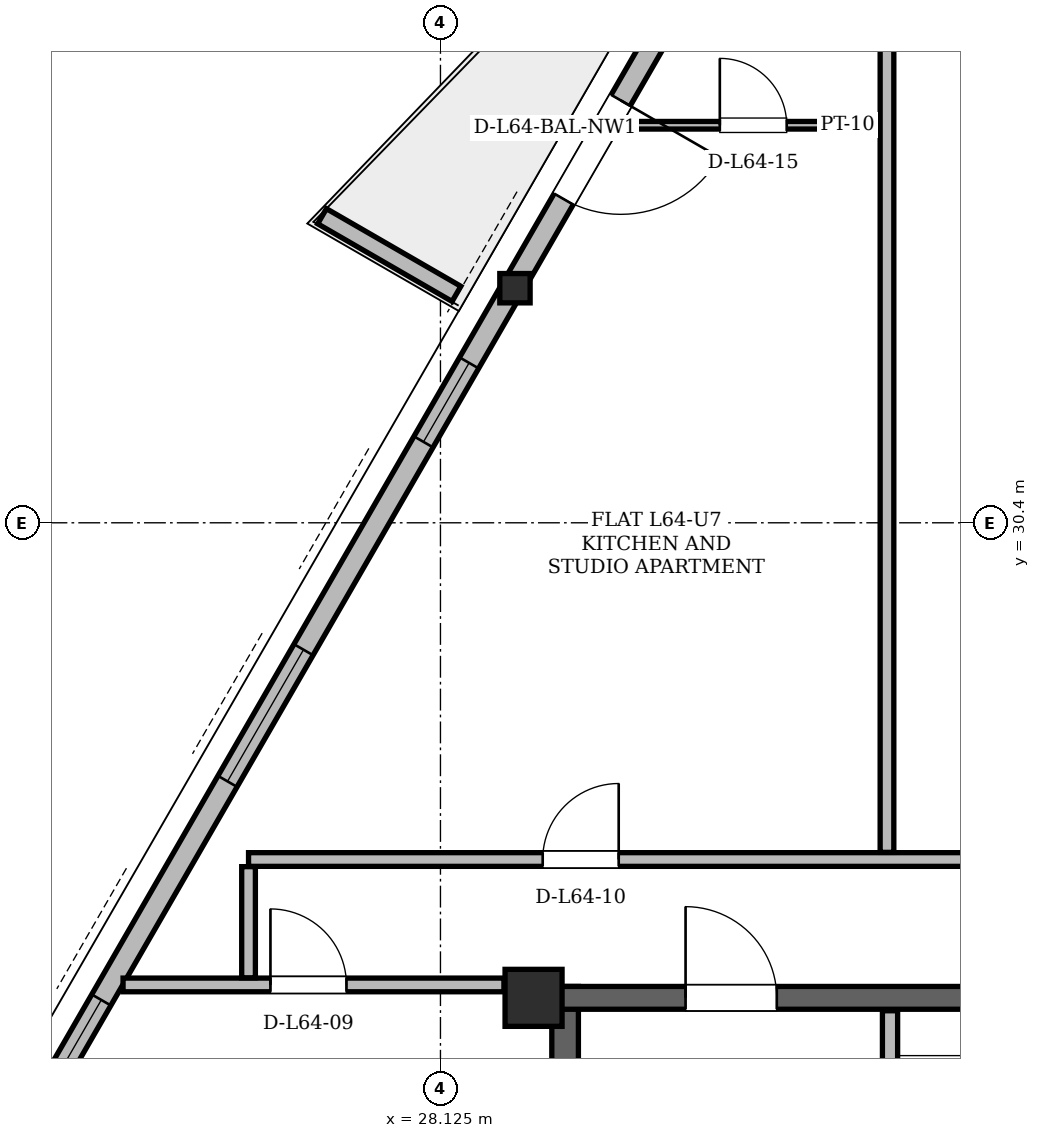
"""IFC4 building model, lengths in metres.
Left out: names, types, materials, properties, quantities, classifications, styles, units other than length and angle.
Written with IfcOpenShell. Run it as: python <this file> out.ifc"""

import sys

from ifc_helpers import new_model, si_unit, direction, frame, frame_2d, origin, origin_2d, place, context, subcontext, project, spatial, polyline, rectangle, hollow_rectangle, i_section, outline, extrude, element, fill, save


model = new_model("IFC4")
c1 = context("Model", 3, precision=1e-05, world=origin(), true_north=direction((0.0, 1.0)))
c2 = subcontext(c1, "Body", "Model", "MODEL_VIEW")
j1 = project(units=[si_unit("LENGTHUNIT", "METRE"), si_unit("PLANEANGLEUNIT", "RADIAN")], contexts=[c1])
p1 = place(None, origin())
s1 = spatial("IfcSite", under=j1, at=p1, CompositionType="ELEMENT")
p2 = place(p1, origin())
s2 = spatial("IfcBuilding", under=s1, at=p2, CompositionType="ELEMENT")
p3 = place(p2, frame((0.0, 0.0, 241.5)))
s3 = spatial("IfcBuildingStorey", under=s2, at=p3, CompositionType="ELEMENT", Elevation=241.5)
p4 = place(p3, frame((29.35, 24.15, 0.0), z_axis=(0.0, 0.0, 1.0), x_axis=(1.0, 0.0, 0.0)))
e1 = element("IfcColumn", 1, at=p4, inside=s3, PredefinedType="COLUMN", context=c2, shape_type="SweptSolid", body=[
    extrude(hollow_rectangle(XDim=0.75, YDim=0.75, WallThickness=0.06, at=origin_2d()), origin(), (0.0, 0.0, 1.0), 3.6),
])
p5 = place(p3, frame((29.075, 33.498, 0.004), z_axis=(0.016585869897, -0.006321663526, 0.999842460336), x_axis=(0.356154573909, 0.934427054127, 0.0)))
e2 = element("IfcColumn", 2, at=p5, inside=s3, PredefinedType="COLUMN", context=c2, shape_type="SweptSolid", body=[
    extrude(i_section(OverallWidth=0.399, OverallDepth=0.386, WebThickness=0.021, FlangeThickness=0.033, at=origin_2d()), origin(), (0.0, 0.0, 1.0), 3.592),
])
p6 = place(p3, frame((29.765, 11.0, 0.0), z_axis=(0.0, 0.0, 1.0), x_axis=(0.0, 1.0, 0.0)))
e3 = element("IfcWall", 3, at=p6, inside=s3, PredefinedType="SHEAR", context=c2, shape_type="SweptSolid", body=[
    extrude(rectangle(XDim=13.3, YDim=0.35, at=frame_2d((6.65, 0.0))), origin(), (0.0, 0.0, 1.0), 3.34),
])
p7 = place(p3, frame((29.65, 24.15, 0.0), z_axis=(0.0, 0.0, 1.0), x_axis=(1.0, 0.0, 0.0)))
e4 = element("IfcWall", 4, at=p7, inside=s3, PredefinedType="SHEAR", context=c2, shape_type="SweptSolid", body=[
    extrude(rectangle(XDim=15.7, YDim=0.3, at=frame_2d((7.85, 0.0))), origin(), (0.0, 0.0, 1.0), 3.34),
])
p8 = place(p7, frame((1.7, 0.0, 0.0)))
e5 = element("IfcOpeningElement", 5, at=p8, cuts=e4, PredefinedType="OPENING", context=c2, shape_type="SweptSolid", body=[
    extrude(rectangle(XDim=1.2, YDim=2.2, at=frame_2d((0.6, 1.1))), frame((0.0, 0.15, 0.0), z_axis=(0.0, -1.0, 0.0), x_axis=(1.0, 0.0, 0.0)), (0.0, 0.0, 1.0), 0.3),
])
p9 = place(p7, frame((12.8, 0.0, 0.0)))
e6 = element("IfcOpeningElement", 6, at=p9, cuts=e4, PredefinedType="OPENING", context=c2, shape_type="SweptSolid", body=[
    extrude(rectangle(XDim=1.2, YDim=2.2, at=frame_2d((0.6, 1.1))), frame((0.0, 0.15, 0.0), z_axis=(0.0, -1.0, 0.0), x_axis=(1.0, 0.0, 0.0)), (0.0, 0.0, 1.0), 0.3),
])
p10 = place(p7, frame((7.4, 0.0, 0.0)))
e7 = element("IfcOpeningElement", 7, at=p10, cuts=e4, PredefinedType="OPENING", context=c2, shape_type="SweptSolid", body=[
    extrude(rectangle(XDim=0.9, YDim=2.05, at=frame_2d((0.45, 1.025))), frame((0.0, 0.15, 0.0), z_axis=(0.0, -1.0, 0.0), x_axis=(1.0, 0.0, 0.0)), (0.0, 0.0, 1.0), 0.3),
])
p11 = place(p3, frame((34.618, 43.098, 0.0), z_axis=(0.0, 0.0, 1.0), x_axis=(-0.499999075663, -0.86602593745, 0.0)))
e8 = element("IfcWall", 8, at=p11, inside=s3, PredefinedType="SOLIDWALL", context=c2, shape_type="SweptSolid", body=[
    extrude(rectangle(XDim=36.951, YDim=0.29, at=frame_2d((18.476, 0.0))), origin(), (0.0, 0.0, 1.0), 2.637),
])
p12 = place(p11, frame((8.244, 0.0, 0.0)))
e9 = element("IfcOpeningElement", 9, at=p12, cuts=e8, PredefinedType="OPENING", context=c2, shape_type="SweptSolid", body=[
    extrude(rectangle(XDim=1.5, YDim=2.2, at=frame_2d((0.75, 1.1))), frame((0.0, 0.145, 0.0), z_axis=(0.0, -1.0, 0.0), x_axis=(1.0, 0.0, 0.0)), (0.0, 0.0, 1.0), 0.29),
])
p13 = place(p11, frame((32.022, 0.0, 0.0)))
e10 = element("IfcOpeningElement", 10, at=p13, cuts=e8, PredefinedType="OPENING", context=c2, shape_type="SweptSolid", body=[
    extrude(rectangle(XDim=1.5, YDim=2.2, at=frame_2d((0.75, 1.1))), frame((0.0, 0.145, 0.0), z_axis=(0.0, -1.0, 0.0), x_axis=(1.0, 0.0, 0.0)), (0.0, 0.0, 1.0), 0.29),
])
p14 = place(p11, frame((21.911, 0.0, 0.85)))
e11 = element("IfcOpeningElement", 11, at=p14, cuts=e8, PredefinedType="OPENING", context=c2, shape_type="SweptSolid", body=[
    extrude(rectangle(XDim=2.4, YDim=1.677, at=frame_2d((1.2, 0.838))), frame((0.0, 0.145, 0.0), z_axis=(0.0, -1.0, 0.0), x_axis=(1.0, 0.0, 0.0)), (0.0, 0.0, 1.0), 0.29),
])
p15 = place(p11, frame((28.29, 0.0, 0.85)))
e12 = element("IfcOpeningElement", 12, at=p15, cuts=e8, PredefinedType="OPENING", context=c2, shape_type="SweptSolid", body=[
    extrude(rectangle(XDim=1.2, YDim=1.48, at=frame_2d((0.6, 0.74))), frame((0.0, 0.145, 0.0), z_axis=(0.0, -1.0, 0.0), x_axis=(1.0, 0.0, 0.0)), (0.0, 0.0, 1.0), 0.29),
])
p16 = place(p11, frame((34.755, 0.0, 0.85)))
e13 = element("IfcOpeningElement", 13, at=p16, cuts=e8, PredefinedType="OPENING", context=c2, shape_type="SweptSolid", body=[
    extrude(rectangle(XDim=1.2, YDim=1.48, at=frame_2d((0.6, 0.74))), frame((0.0, 0.145, 0.0), z_axis=(0.0, -1.0, 0.0), x_axis=(1.0, 0.0, 0.0)), (0.0, 0.0, 1.0), 0.29),
])
p17 = place(p11, frame((12.233, 0.0, 0.85)))
e14 = element("IfcOpeningElement", 14, at=p17, cuts=e8, PredefinedType="OPENING", context=c2, shape_type="SweptSolid", body=[
    extrude(rectangle(XDim=1.2, YDim=1.48, at=frame_2d((0.6, 0.74))), frame((0.0, 0.145, 0.0), z_axis=(0.0, -1.0, 0.0), x_axis=(1.0, 0.0, 0.0)), (0.0, 0.0, 1.0), 0.29),
])
p18 = place(p11, frame((16.59, 0.0, 0.85)))
e15 = element("IfcOpeningElement", 15, at=p18, cuts=e8, PredefinedType="OPENING", context=c2, shape_type="SweptSolid", body=[
    extrude(rectangle(XDim=2.0, YDim=1.677, at=frame_2d((1.0, 0.838))), frame((0.0, 0.145, 0.0), z_axis=(0.0, -1.0, 0.0), x_axis=(1.0, 0.0, 0.0)), (0.0, 0.0, 1.0), 0.29),
])
p19 = place(p11, frame((3.092, 0.0, 0.85)))
e16 = element("IfcOpeningElement", 16, at=p19, cuts=e8, PredefinedType="OPENING", context=c2, shape_type="SweptSolid", body=[
    extrude(rectangle(XDim=1.2, YDim=1.48, at=frame_2d((0.6, 0.74))), frame((0.0, 0.145, 0.0), z_axis=(0.0, -1.0, 0.0), x_axis=(1.0, 0.0, 0.0)), (0.0, 0.0, 1.0), 0.29),
])
p20 = place(p3, frame((28.336, 33.412, 0.0), z_axis=(0.0, 0.0, 1.0), x_axis=(-0.866042246008, 0.499970827278, 0.0)))
e17 = element("IfcWall", 17, at=p20, inside=s3, PredefinedType="PARAPET", context=c2, shape_type="SweptSolid", body=[
    extrude(outline(polyline([(0.0, 0.0), (2.042, 0.0), (2.042, 1.1), (0.0, 1.32), (0.0, 0.0)])), frame((0.0, 0.115, 0.0), z_axis=(0.0, -1.0, 0.0), x_axis=(1.0, 0.0, 0.0)), (0.0, 0.0, 1.0), 0.23),
])
p21 = place(p3, frame((34.04, 19.48, 0.0), z_axis=(0.0, 0.0, 1.0), x_axis=(0.0, 1.0, 0.0)))
e18 = element("IfcWall", 18, at=p21, inside=s3, PredefinedType="PARTITIONING", context=c2, shape_type="SweptSolid", body=[
    extrude(rectangle(XDim=4.5, YDim=0.2, at=frame_2d((2.25, 0.0))), origin(), (0.0, 0.0, 1.0), 3.34),
])
p22 = place(p21, frame((2.12, 0.0, 0.0)))
e19 = element("IfcOpeningElement", 19, at=p22, cuts=e18, PredefinedType="OPENING", context=c2, shape_type="SweptSolid", body=[
    extrude(rectangle(XDim=1.1, YDim=2.2, at=frame_2d((0.55, 1.1))), frame((0.0, 0.1, 0.0), z_axis=(0.0, -1.0, 0.0), x_axis=(1.0, 0.0, 0.0)), (0.0, 0.0, 1.0), 0.2),
])
p23 = place(p3, frame((23.949, 24.32, 0.0), z_axis=(0.0, 0.0, 1.0), x_axis=(1.0, 0.0, 0.0)))
e20 = element("IfcWall", 20, at=p23, inside=s3, PredefinedType="PARTITIONING", context=c2, shape_type="SweptSolid", body=[
    extrude(rectangle(XDim=5.011, YDim=0.18, at=frame_2d((2.505, 0.0))), origin(), (0.0, 0.0, 1.0), 3.34),
])
p24 = place(p23, frame((1.939, 0.0, 0.0)))
e21 = element("IfcOpeningElement", 21, at=p24, cuts=e20, PredefinedType="OPENING", context=c2, shape_type="SweptSolid", body=[
    extrude(rectangle(XDim=1.0, YDim=2.18, at=frame_2d((0.5, 1.09))), frame((0.0, 0.09, 0.0), z_axis=(0.0, -1.0, 0.0), x_axis=(1.0, 0.0, 0.0)), (0.0, 0.0, 1.0), 0.18),
])
p25 = place(p3, frame((25.6, 25.97, 0.0), z_axis=(0.0, 0.0, 1.0), x_axis=(1.0, 0.0, 0.0)))
e22 = element("IfcWall", 22, at=p25, inside=s3, PredefinedType="PARTITIONING", context=c2, shape_type="SweptSolid", body=[
    extrude(rectangle(XDim=21.85, YDim=0.18, at=frame_2d((10.925, 0.0))), origin(), (0.0, 0.0, 1.0), 2.873),
])
p26 = place(p25, frame((3.87, 0.0, 0.0)))
e23 = element("IfcOpeningElement", 23, at=p26, cuts=e22, PredefinedType="OPENING", context=c2, shape_type="SweptSolid", body=[
    extrude(rectangle(XDim=1.0, YDim=2.18, at=frame_2d((0.5, 1.09))), frame((0.0, 0.09, 0.0), z_axis=(0.0, -1.0, 0.0), x_axis=(1.0, 0.0, 0.0)), (0.0, 0.0, 1.0), 0.18),
])
p27 = place(p25, frame((9.833, 0.0, 0.0)))
e24 = element("IfcOpeningElement", 24, at=p27, cuts=e22, PredefinedType="OPENING", context=c2, shape_type="SweptSolid", body=[
    extrude(rectangle(XDim=1.0, YDim=2.18, at=frame_2d((0.5, 1.09))), frame((0.0, 0.09, 0.0), z_axis=(0.0, -1.0, 0.0), x_axis=(1.0, 0.0, 0.0)), (0.0, 0.0, 1.0), 0.18),
])
p28 = place(p25, frame((15.35, 0.0, 0.0)))
e25 = element("IfcOpeningElement", 25, at=p28, cuts=e22, PredefinedType="OPENING", context=c2, shape_type="SweptSolid", body=[
    extrude(rectangle(XDim=1.3, YDim=2.2, at=frame_2d((0.65, 1.1))), frame((0.0, 0.09, 0.0), z_axis=(0.0, -1.0, 0.0), x_axis=(1.0, 0.0, 0.0)), (0.0, 0.0, 1.0), 0.18),
])
p29 = place(p25, frame((18.94, 0.0, 0.0)))
e26 = element("IfcOpeningElement", 26, at=p29, cuts=e22, PredefinedType="OPENING", context=c2, shape_type="SweptSolid", body=[
    extrude(rectangle(XDim=1.0, YDim=2.18, at=frame_2d((0.5, 1.09))), frame((0.0, 0.09, 0.0), z_axis=(0.0, -1.0, 0.0), x_axis=(1.0, 0.0, 0.0)), (0.0, 0.0, 1.0), 0.18),
])
p30 = place(p3, frame((30.479, 35.63, 0.0), z_axis=(0.0, 0.0, 1.0), x_axis=(1.0, 0.0, 0.0)))
e27 = element("IfcWall", 27, at=p30, inside=s3, PredefinedType="PARTITIONING", context=c2, shape_type="SweptSolid", body=[
    extrude(rectangle(XDim=3.603, YDim=0.1, at=frame_2d((1.802, 0.0))), origin(), (0.0, 0.0, 1.0), 3.34),
])
p31 = place(p30, frame((1.322, 0.0, 0.0)))
e28 = element("IfcOpeningElement", 28, at=p31, cuts=e27, PredefinedType="OPENING", context=c2, shape_type="SweptSolid", body=[
    extrude(rectangle(XDim=0.88, YDim=2.08, at=frame_2d((0.44, 1.04))), frame((0.0, 0.05, 0.0), z_axis=(0.0, -1.0, 0.0), x_axis=(1.0, 0.0, 0.0)), (0.0, 0.0, 1.0), 0.1),
])
p32 = place(p3, frame((25.6, 24.414, 0.0), z_axis=(0.0, 0.0, 1.0), x_axis=(0.0, 1.0, 0.0)))
e29 = element("IfcWall", 29, at=p32, inside=s3, PredefinedType="PARTITIONING", context=c2, shape_type="SweptSolid", body=[
    extrude(rectangle(XDim=1.462, YDim=0.18, at=frame_2d((0.731, 0.0))), origin(), (0.0, 0.0, 1.0), 3.34),
])
p33 = place(p3, frame((34.0, 26.064, 0.0), z_axis=(0.0, 0.0, 1.0), x_axis=(0.0, 1.0, 0.0)))
e30 = element("IfcWall", 30, at=p33, inside=s3, PredefinedType="PARTITIONING", context=c2, shape_type="SweptSolid", body=[
    extrude(rectangle(XDim=15.665, YDim=0.18, at=frame_2d((7.833, 0.0))), origin(), (0.0, 0.0, 1.0), 2.873),
])
p34 = place(p12, origin())
e31 = element("IfcDoor", 31, at=p34, inside=s3, OperationType="SINGLE_SWING_LEFT", PredefinedType="DOOR", context=c2, shape_type="SweptSolid", body=[
    extrude(rectangle(XDim=1.5, YDim=2.2, at=frame_2d((0.75, 1.1))), frame((0.0, 0.025, 0.0), z_axis=(0.0, -1.0, 0.0), x_axis=(1.0, 0.0, 0.0)), (0.0, 0.0, 1.0), 0.05),
])
fill(e9, e31)
p35 = place(p14, origin())
e32 = element("IfcWindow", 32, at=p35, inside=s3, PartitioningType="SINGLE_PANEL", PredefinedType="WINDOW", context=c2, shape_type="SweptSolid", body=[
    extrude(rectangle(XDim=2.4, YDim=1.677, at=frame_2d((1.2, 0.838))), frame((0.0, 0.03, 0.0), z_axis=(0.0, -1.0, 0.0), x_axis=(1.0, 0.0, 0.0)), (0.0, 0.0, 1.0), 0.06),
])
fill(e11, e32)
p36 = place(p17, origin())
e33 = element("IfcWindow", 33, at=p36, inside=s3, PartitioningType="SINGLE_PANEL", PredefinedType="WINDOW", context=c2, shape_type="SweptSolid", body=[
    extrude(rectangle(XDim=1.2, YDim=1.48, at=frame_2d((0.6, 0.74))), frame((0.0, 0.03, 0.0), z_axis=(0.0, -1.0, 0.0), x_axis=(1.0, 0.0, 0.0)), (0.0, 0.0, 1.0), 0.06),
])
fill(e14, e33)
p37 = place(p18, origin())
e34 = element("IfcWindow", 34, at=p37, inside=s3, PartitioningType="SINGLE_PANEL", PredefinedType="WINDOW", context=c2, shape_type="SweptSolid", body=[
    extrude(rectangle(XDim=2.0, YDim=1.677, at=frame_2d((1.0, 0.838))), frame((0.0, 0.03, 0.0), z_axis=(0.0, -1.0, 0.0), x_axis=(1.0, 0.0, 0.0)), (0.0, 0.0, 1.0), 0.06),
])
fill(e15, e34)
p38 = place(p8, origin())
e35 = element("IfcDoor", 35, at=p38, inside=s3, OperationType="SINGLE_SWING_LEFT", PredefinedType="DOOR", context=c2, shape_type="SweptSolid", body=[
    extrude(rectangle(XDim=1.2, YDim=2.2, at=frame_2d((0.6, 1.1))), frame((0.0, 0.025, 0.0), z_axis=(0.0, -1.0, 0.0), x_axis=(1.0, 0.0, 0.0)), (0.0, 0.0, 1.0), 0.05),
])
fill(e5, e35)
p39 = place(p24, origin())
e36 = element("IfcDoor", 36, at=p39, inside=s3, OperationType="SINGLE_SWING_LEFT", PredefinedType="DOOR", context=c2, shape_type="SweptSolid", body=[
    extrude(rectangle(XDim=1.0, YDim=2.18, at=frame_2d((0.5, 1.09))), frame((0.0, 0.025, 0.0), z_axis=(0.0, -1.0, 0.0), x_axis=(1.0, 0.0, 0.0)), (0.0, 0.0, 1.0), 0.05),
])
fill(e21, e36)
p40 = place(p26, origin())
e37 = element("IfcDoor", 37, at=p40, inside=s3, OperationType="SINGLE_SWING_RIGHT", PredefinedType="DOOR", context=c2, shape_type="SweptSolid", body=[
    extrude(rectangle(XDim=1.0, YDim=2.18, at=frame_2d((0.5, 1.09))), frame((0.0, 0.025, 0.0), z_axis=(0.0, -1.0, 0.0), x_axis=(1.0, 0.0, 0.0)), (0.0, 0.0, 1.0), 0.05),
])
fill(e23, e37)
p41 = place(p31, origin())
e38 = element("IfcDoor", 38, at=p41, inside=s3, OperationType="SINGLE_SWING_LEFT", PredefinedType="DOOR", context=c2, shape_type="SweptSolid", body=[
    extrude(rectangle(XDim=0.88, YDim=2.08, at=frame_2d((0.44, 1.04))), frame((0.0, 0.025, 0.0), z_axis=(0.0, -1.0, 0.0), x_axis=(1.0, 0.0, 0.0)), (0.0, 0.0, 1.0), 0.05),
])
fill(e28, e38)
save(model, sys.argv[1])
